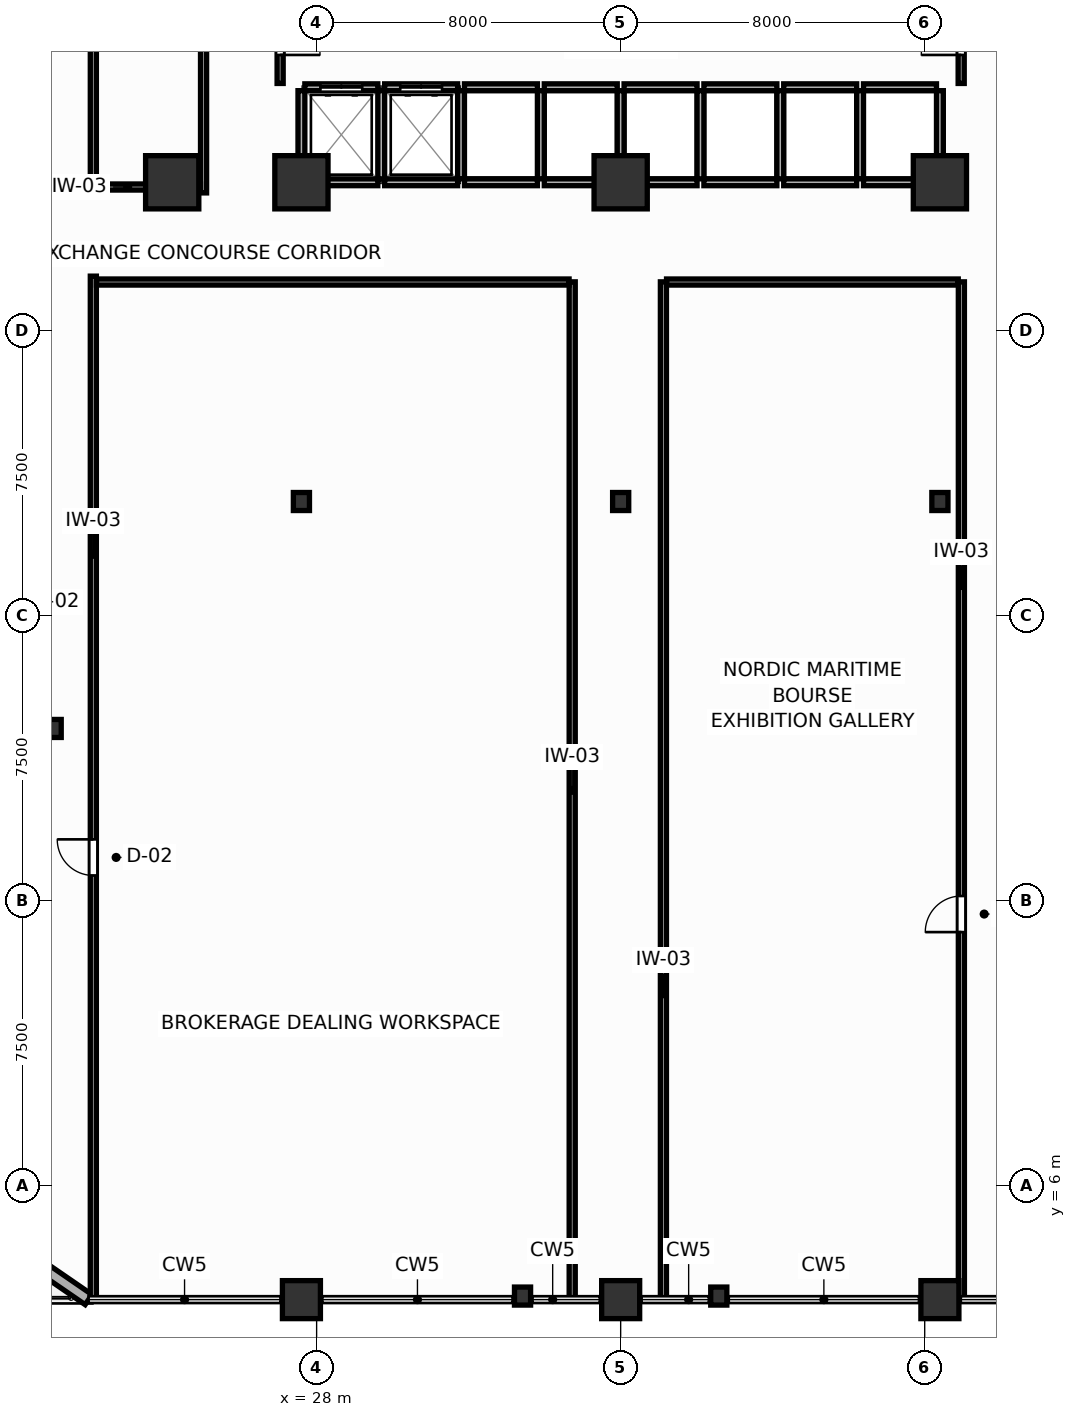
"""IFC4 building model, lengths in metres.
Left out: names, types, materials, properties, quantities, classifications, styles, units other than length and angle.
Written with IfcOpenShell. Run it as: python <this file> out.ifc"""

import sys

from ifc_helpers import new_model, si_unit, direction, frame, frame_2d, origin, origin_2d, place, context, subcontext, project, spatial, rectangle, i_section, extrude, source, transform, mapped, element, fill, save


model = new_model("IFC4")
c1 = context("Model", 3, precision=1e-05, world=origin(), true_north=direction((0.0, 1.0)))
c2 = subcontext(c1, "Body", "Model", "MODEL_VIEW")
j1 = project(units=[si_unit("LENGTHUNIT", "METRE"), si_unit("PLANEANGLEUNIT", "RADIAN")], contexts=[c1])
p1 = place(None, origin())
s1 = spatial("IfcSite", under=j1, at=p1, CompositionType="ELEMENT")
p2 = place(p1, origin())
s2 = spatial("IfcBuilding", under=s1, at=p2, CompositionType="ELEMENT")
p3 = place(p2, frame((0.0, 0.0, 19.2)))
s3 = spatial("IfcBuildingStorey", under=s2, at=p3, CompositionType="ELEMENT", Elevation=19.2)
m1 = source(origin(), c2, "Body", "SweptSolid", [
    extrude(rectangle(XDim=1.4, YDim=1.4, at=origin_2d()), origin(), (0.0, 0.0, 1.0), 4.8),
])
for number, where, z_axis, x_axis in (
    (1, (27.6, 32.4, 0.0), (0.0, 0.0, 1.0), (1.0, 0.0, 0.0)),
    (2, (44.4, 32.4, 0.0), (0.0, 0.0, 1.0), (1.0, 0.0, 0.0)),
    (3, (36.0, 32.4, 0.0), (0.0, 0.0, 1.0), (1.0, 0.0, 0.0)),
    (4, (24.2, 32.4, 0.0), (0.0, 0.0, 1.0), (1.0, 0.0, 0.0)),
):
    element("IfcColumn", number, at=place(p3, frame(where, z_axis=z_axis, x_axis=x_axis)), inside=s3, PredefinedType="COLUMN", context=c2, shape_type="MappedRepresentation", body=[
        mapped(m1, transform((0.0, 0.0, 0.0), scale=1.0)),
    ])
m2 = source(origin(), c2, "Body", "SweptSolid", [
    extrude(i_section(OverallWidth=0.424, OverallDepth=0.474, WebThickness=0.045, FlangeThickness=0.072, FilletRadius=0.015, at=origin_2d()), origin(), (0.0, 0.0, 1.0), 4.8),
])
for number, where, z_axis, x_axis in (
    (5, (27.6, 24.0, 0.0), (0.0, 0.0, 1.0), (1.0, 0.0, 0.0)),
    (6, (44.4, 24.0, 0.0), (0.0, 0.0, 1.0), (1.0, 0.0, 0.0)),
    (7, (36.0, 24.0, 0.0), (0.0, 0.0, 1.0), (1.0, 0.0, 0.0)),
):
    element("IfcColumn", number, at=place(p3, frame(where, z_axis=z_axis, x_axis=x_axis)), inside=s3, PredefinedType="COLUMN", context=c2, shape_type="MappedRepresentation", body=[
        mapped(m2, transform((0.0, 0.0, 0.0), scale=1.0)),
    ])
m3 = source(origin(), c2, "Body", "SweptSolid", [
    extrude(rectangle(XDim=1.0, YDim=1.0, at=origin_2d()), origin(), (0.0, 0.0, 1.0), 4.8),
])
for number, where, z_axis, x_axis in (
    (8, (27.6, 3.0, 0.0), (0.0, 0.0, 1.0), (1.0, 0.0, 0.0)),
    (9, (36.0, 3.0, 0.0), (0.0, 0.0, 1.0), (1.0, 0.0, 0.0)),
    (10, (44.4, 3.0, 0.0), (0.0, 0.0, 1.0), (1.0, 0.0, 0.0)),
):
    element("IfcColumn", number, at=place(p3, frame(where, z_axis=z_axis, x_axis=x_axis)), inside=s3, PredefinedType="COLUMN", context=c2, shape_type="MappedRepresentation", body=[
        mapped(m3, transform((0.0, 0.0, 0.0), scale=1.0)),
    ])
for number, where, z_axis, x_axis in (
    (11, (21.068, 18.029, 0.0), (0.0, 0.0, 1.0), (1.0, 0.0, 0.0)),
    (12, (33.418, 3.094, 0.0), (0.0, 0.0, 1.0), (1.0, 0.0, 0.0)),
    (13, (38.582, 3.094, 0.0), (0.0, 0.0, 1.0), (1.0, 0.0, 0.0)),
):
    element("IfcColumn", number, at=place(p3, frame(where, z_axis=z_axis, x_axis=x_axis)), inside=s3, PredefinedType="COLUMN", context=c2, shape_type="MappedRepresentation", body=[
        mapped(m2, transform((0.0, 0.0, 0.0), scale=1.0)),
    ])
p4 = place(p3, frame((6.0, 14.0, 0.0), z_axis=(0.0, 0.0, 1.0), x_axis=(0.824041924199, -0.566528822887, 0.0)))
e14 = element("IfcWall", 14, at=p4, inside=s3, PredefinedType="SOLIDWALL", context=c2, shape_type="SweptSolid", body=[
    extrude(rectangle(XDim=19.417, YDim=0.32, at=frame_2d((9.708, 0.0))), origin(), (0.0, 0.0, 1.0), 4.58),
])
p5 = place(p4, frame((9.183, 0.0, 0.0)))
e15 = element("IfcOpeningElement", 15, at=p5, cuts=e14, PredefinedType="OPENING", context=c2, shape_type="SweptSolid", body=[
    extrude(rectangle(XDim=1.05, YDim=2.1, at=frame_2d((0.525, 1.05))), frame((0.0, 0.17, 0.0), z_axis=(0.0, -1.0, 0.0), x_axis=(1.0, 0.0, 0.0)), (0.0, 0.0, 1.0), 0.34),
])
p6 = place(p3, frame((27.69, 34.9, 0.0), z_axis=(0.0, 0.0, 1.0), x_axis=(1.0, 0.0, 0.0)))
e16 = element("IfcWall", 16, at=p6, inside=s3, PredefinedType="PARTITIONING", context=c2, shape_type="SweptSolid", body=[
    extrude(rectangle(XDim=1.92, YDim=0.18, at=frame_2d((0.96, 0.0))), origin(), (0.0, 0.0, 1.0), 4.58),
])
p7 = place(p6, frame((0.41, 0.0, 0.0)))
e17 = element("IfcOpeningElement", 17, at=p7, cuts=e16, PredefinedType="OPENING", context=c2, shape_type="SweptSolid", body=[
    extrude(rectangle(XDim=1.1, YDim=2.1, at=frame_2d((0.55, 1.05))), frame((0.0, 0.1, 0.0), z_axis=(0.0, -1.0, 0.0), x_axis=(1.0, 0.0, 0.0)), (0.0, 0.0, 1.0), 0.2),
])
p8 = place(p3, frame((27.69, 32.4, 0.0), z_axis=(0.0, 0.0, 1.0), x_axis=(1.0, 0.0, 0.0)))
e18 = element("IfcWall", 18, at=p8, inside=s3, PredefinedType="PARTITIONING", context=c2, shape_type="SweptSolid", body=[
    extrude(rectangle(XDim=1.92, YDim=0.18, at=frame_2d((0.96, 0.0))), origin(), (0.0, 0.0, 1.0), 3.88),
])
p9 = place(p3, frame((27.6, 32.49, 0.0), z_axis=(0.0, 0.0, 1.0), x_axis=(0.0, 1.0, 0.0)))
e19 = element("IfcWall", 19, at=p9, inside=s3, PredefinedType="PARTITIONING", context=c2, shape_type="SweptSolid", body=[
    extrude(rectangle(XDim=2.32, YDim=0.18, at=frame_2d((1.16, 0.0))), origin(), (0.0, 0.0, 1.0), 4.58),
])
p10 = place(p3, frame((29.79, 34.9, 0.0), z_axis=(0.0, 0.0, 1.0), x_axis=(1.0, 0.0, 0.0)))
e20 = element("IfcWall", 20, at=p10, inside=s3, PredefinedType="PARTITIONING", context=c2, shape_type="SweptSolid", body=[
    extrude(rectangle(XDim=1.92, YDim=0.18, at=frame_2d((0.96, 0.0))), origin(), (0.0, 0.0, 1.0), 4.58),
])
p11 = place(p10, frame((0.41, 0.0, 0.0)))
e21 = element("IfcOpeningElement", 21, at=p11, cuts=e20, PredefinedType="OPENING", context=c2, shape_type="SweptSolid", body=[
    extrude(rectangle(XDim=1.1, YDim=2.1, at=frame_2d((0.55, 1.05))), frame((0.0, 0.1, 0.0), z_axis=(0.0, -1.0, 0.0), x_axis=(1.0, 0.0, 0.0)), (0.0, 0.0, 1.0), 0.2),
])
p12 = place(p3, frame((29.79, 32.4, 0.0), z_axis=(0.0, 0.0, 1.0), x_axis=(1.0, 0.0, 0.0)))
e22 = element("IfcWall", 22, at=p12, inside=s3, PredefinedType="PARTITIONING", context=c2, shape_type="SweptSolid", body=[
    extrude(rectangle(XDim=1.92, YDim=0.18, at=frame_2d((0.96, 0.0))), origin(), (0.0, 0.0, 1.0), 3.88),
])
p13 = place(p3, frame((29.7, 32.49, 0.0), z_axis=(0.0, 0.0, 1.0), x_axis=(0.0, 1.0, 0.0)))
e23 = element("IfcWall", 23, at=p13, inside=s3, PredefinedType="PARTITIONING", context=c2, shape_type="SweptSolid", body=[
    extrude(rectangle(XDim=2.32, YDim=0.18, at=frame_2d((1.16, 0.0))), origin(), (0.0, 0.0, 1.0), 4.58),
])
p14 = place(p3, frame((31.89, 34.9, 0.0), z_axis=(0.0, 0.0, 1.0), x_axis=(1.0, 0.0, 0.0)))
e24 = element("IfcWall", 24, at=p14, inside=s3, PredefinedType="PARTITIONING", context=c2, shape_type="SweptSolid", body=[
    extrude(rectangle(XDim=1.92, YDim=0.18, at=frame_2d((0.96, 0.0))), origin(), (0.0, 0.0, 1.0), 4.58),
])
p15 = place(p3, frame((31.89, 32.4, 0.0), z_axis=(0.0, 0.0, 1.0), x_axis=(1.0, 0.0, 0.0)))
e25 = element("IfcWall", 25, at=p15, inside=s3, PredefinedType="PARTITIONING", context=c2, shape_type="SweptSolid", body=[
    extrude(rectangle(XDim=1.92, YDim=0.18, at=frame_2d((0.96, 0.0))), origin(), (0.0, 0.0, 1.0), 3.88),
])
p16 = place(p3, frame((31.8, 32.49, 0.0), z_axis=(0.0, 0.0, 1.0), x_axis=(0.0, 1.0, 0.0)))
e26 = element("IfcWall", 26, at=p16, inside=s3, PredefinedType="PARTITIONING", context=c2, shape_type="SweptSolid", body=[
    extrude(rectangle(XDim=2.32, YDim=0.18, at=frame_2d((1.16, 0.0))), origin(), (0.0, 0.0, 1.0), 4.58),
])
p17 = place(p3, frame((33.99, 34.9, 0.0), z_axis=(0.0, 0.0, 1.0), x_axis=(1.0, 0.0, 0.0)))
e27 = element("IfcWall", 27, at=p17, inside=s3, PredefinedType="PARTITIONING", context=c2, shape_type="SweptSolid", body=[
    extrude(rectangle(XDim=1.92, YDim=0.18, at=frame_2d((0.96, 0.0))), origin(), (0.0, 0.0, 1.0), 4.58),
])
p18 = place(p3, frame((33.99, 32.4, 0.0), z_axis=(0.0, 0.0, 1.0), x_axis=(1.0, 0.0, 0.0)))
e28 = element("IfcWall", 28, at=p18, inside=s3, PredefinedType="PARTITIONING", context=c2, shape_type="SweptSolid", body=[
    extrude(rectangle(XDim=1.92, YDim=0.18, at=frame_2d((0.96, 0.0))), origin(), (0.0, 0.0, 1.0), 3.88),
])
p19 = place(p3, frame((33.9, 32.49, 0.0), z_axis=(0.0, 0.0, 1.0), x_axis=(0.0, 1.0, 0.0)))
e29 = element("IfcWall", 29, at=p19, inside=s3, PredefinedType="PARTITIONING", context=c2, shape_type="SweptSolid", body=[
    extrude(rectangle(XDim=2.32, YDim=0.18, at=frame_2d((1.16, 0.0))), origin(), (0.0, 0.0, 1.0), 4.58),
])
p20 = place(p3, frame((36.09, 34.9, 0.0), z_axis=(0.0, 0.0, 1.0), x_axis=(1.0, 0.0, 0.0)))
e30 = element("IfcWall", 30, at=p20, inside=s3, PredefinedType="PARTITIONING", context=c2, shape_type="SweptSolid", body=[
    extrude(rectangle(XDim=1.92, YDim=0.18, at=frame_2d((0.96, 0.0))), origin(), (0.0, 0.0, 1.0), 4.58),
])
p21 = place(p3, frame((36.09, 32.4, 0.0), z_axis=(0.0, 0.0, 1.0), x_axis=(1.0, 0.0, 0.0)))
e31 = element("IfcWall", 31, at=p21, inside=s3, PredefinedType="PARTITIONING", context=c2, shape_type="SweptSolid", body=[
    extrude(rectangle(XDim=1.92, YDim=0.18, at=frame_2d((0.96, 0.0))), origin(), (0.0, 0.0, 1.0), 3.88),
])
p22 = place(p3, frame((36.0, 32.49, 0.0), z_axis=(0.0, 0.0, 1.0), x_axis=(0.0, 1.0, 0.0)))
e32 = element("IfcWall", 32, at=p22, inside=s3, PredefinedType="PARTITIONING", context=c2, shape_type="SweptSolid", body=[
    extrude(rectangle(XDim=2.32, YDim=0.18, at=frame_2d((1.16, 0.0))), origin(), (0.0, 0.0, 1.0), 4.58),
])
p23 = place(p3, frame((38.19, 34.9, 0.0), z_axis=(0.0, 0.0, 1.0), x_axis=(1.0, 0.0, 0.0)))
e33 = element("IfcWall", 33, at=p23, inside=s3, PredefinedType="PARTITIONING", context=c2, shape_type="SweptSolid", body=[
    extrude(rectangle(XDim=1.92, YDim=0.18, at=frame_2d((0.96, 0.0))), origin(), (0.0, 0.0, 1.0), 4.58),
])
p24 = place(p3, frame((38.19, 32.4, 0.0), z_axis=(0.0, 0.0, 1.0), x_axis=(1.0, 0.0, 0.0)))
e34 = element("IfcWall", 34, at=p24, inside=s3, PredefinedType="PARTITIONING", context=c2, shape_type="SweptSolid", body=[
    extrude(rectangle(XDim=1.92, YDim=0.18, at=frame_2d((0.96, 0.0))), origin(), (0.0, 0.0, 1.0), 3.88),
])
p25 = place(p3, frame((38.1, 32.49, 0.0), z_axis=(0.0, 0.0, 1.0), x_axis=(0.0, 1.0, 0.0)))
e35 = element("IfcWall", 35, at=p25, inside=s3, PredefinedType="PARTITIONING", context=c2, shape_type="SweptSolid", body=[
    extrude(rectangle(XDim=2.32, YDim=0.18, at=frame_2d((1.16, 0.0))), origin(), (0.0, 0.0, 1.0), 4.58),
])
p26 = place(p3, frame((40.29, 34.9, 0.0), z_axis=(0.0, 0.0, 1.0), x_axis=(1.0, 0.0, 0.0)))
e36 = element("IfcWall", 36, at=p26, inside=s3, PredefinedType="PARTITIONING", context=c2, shape_type="SweptSolid", body=[
    extrude(rectangle(XDim=1.92, YDim=0.18, at=frame_2d((0.96, 0.0))), origin(), (0.0, 0.0, 1.0), 4.58),
])
p27 = place(p3, frame((40.29, 32.4, 0.0), z_axis=(0.0, 0.0, 1.0), x_axis=(1.0, 0.0, 0.0)))
e37 = element("IfcWall", 37, at=p27, inside=s3, PredefinedType="PARTITIONING", context=c2, shape_type="SweptSolid", body=[
    extrude(rectangle(XDim=1.92, YDim=0.18, at=frame_2d((0.96, 0.0))), origin(), (0.0, 0.0, 1.0), 3.88),
])
p28 = place(p3, frame((40.2, 32.49, 0.0), z_axis=(0.0, 0.0, 1.0), x_axis=(0.0, 1.0, 0.0)))
e38 = element("IfcWall", 38, at=p28, inside=s3, PredefinedType="PARTITIONING", context=c2, shape_type="SweptSolid", body=[
    extrude(rectangle(XDim=2.32, YDim=0.18, at=frame_2d((1.16, 0.0))), origin(), (0.0, 0.0, 1.0), 4.58),
])
p29 = place(p3, frame((42.39, 34.9, 0.0), z_axis=(0.0, 0.0, 1.0), x_axis=(1.0, 0.0, 0.0)))
e39 = element("IfcWall", 39, at=p29, inside=s3, PredefinedType="PARTITIONING", context=c2, shape_type="SweptSolid", body=[
    extrude(rectangle(XDim=1.92, YDim=0.18, at=frame_2d((0.96, 0.0))), origin(), (0.0, 0.0, 1.0), 4.58),
])
p30 = place(p3, frame((42.39, 32.4, 0.0), z_axis=(0.0, 0.0, 1.0), x_axis=(1.0, 0.0, 0.0)))
e40 = element("IfcWall", 40, at=p30, inside=s3, PredefinedType="PARTITIONING", context=c2, shape_type="SweptSolid", body=[
    extrude(rectangle(XDim=1.92, YDim=0.18, at=frame_2d((0.96, 0.0))), origin(), (0.0, 0.0, 1.0), 3.88),
])
for number, where, z_axis, x_axis in (
    (41, (42.3, 32.49, 0.0), (0.0, 0.0, 1.0), (0.0, 1.0, 0.0)),
    (42, (44.4, 32.49, 0.0), (0.0, 0.0, 1.0), (0.0, 1.0, 0.0)),
):
    element("IfcWall", number, at=place(p3, frame(where, z_axis=z_axis, x_axis=x_axis)), inside=s3, PredefinedType="PARTITIONING", context=c2, shape_type="SweptSolid", body=[
        extrude(rectangle(XDim=2.32, YDim=0.18, at=frame_2d((1.16, 0.0))), origin(), (0.0, 0.0, 1.0), 4.58),
    ])
p31 = place(p3, frame((27.04, 35.0, 0.0), z_axis=(0.0, 0.0, 1.0), x_axis=(0.0, 1.0, 0.0)))
e43 = element("IfcWall", 43, at=p31, inside=s3, PredefinedType="PARTITIONING", context=c2, shape_type="SweptSolid", body=[
    extrude(rectangle(XDim=2.65, YDim=0.16, at=frame_2d((1.325, 0.0))), origin(), (0.0, 0.0, 1.0), 4.58),
])
p32 = place(p31, frame((0.75, 0.0, 0.0)))
e44 = element("IfcOpeningElement", 44, at=p32, cuts=e43, PredefinedType="OPENING", context=c2, shape_type="SweptSolid", body=[
    extrude(rectangle(XDim=1.05, YDim=2.1, at=frame_2d((0.525, 1.05))), frame((0.0, 0.09, 0.0), z_axis=(0.0, -1.0, 0.0), x_axis=(1.0, 0.0, 0.0)), (0.0, 0.0, 1.0), 0.18),
])
p33 = place(p3, frame((44.96, 35.0, 0.0), z_axis=(0.0, 0.0, 1.0), x_axis=(0.0, 1.0, 0.0)))
e45 = element("IfcWall", 45, at=p33, inside=s3, PredefinedType="PARTITIONING", context=c2, shape_type="SweptSolid", body=[
    extrude(rectangle(XDim=2.65, YDim=0.16, at=frame_2d((1.325, 0.0))), origin(), (0.0, 0.0, 1.0), 4.58),
])
p34 = place(p33, frame((0.75, 0.0, 0.0)))
e46 = element("IfcOpeningElement", 46, at=p34, cuts=e45, PredefinedType="OPENING", context=c2, shape_type="SweptSolid", body=[
    extrude(rectangle(XDim=1.05, YDim=2.1, at=frame_2d((0.525, 1.05))), frame((0.0, 0.09, 0.0), z_axis=(0.0, -1.0, 0.0), x_axis=(1.0, 0.0, 0.0)), (0.0, 0.0, 1.0), 0.18),
])
p35 = place(p3, frame((22.125, 3.02, 0.0), z_axis=(0.0, 0.0, 1.0), x_axis=(9.072517e-06, 0.999999999959, 0.0)))
e47 = element("IfcWall", 47, at=p35, inside=s3, PredefinedType="PARTITIONING", context=c2, shape_type="SweptSolid", body=[
    extrude(rectangle(XDim=26.91, YDim=0.16, at=frame_2d((13.455, 0.0))), origin(), (0.0, 0.0, 1.0), 4.58),
])
p36 = place(p35, frame((11.14, 0.0, 0.0)))
e48 = element("IfcOpeningElement", 48, at=p36, cuts=e47, PredefinedType="OPENING", context=c2, shape_type="SweptSolid", body=[
    extrude(rectangle(XDim=0.95, YDim=2.05, at=frame_2d((0.475, 1.025))), frame((0.0, 0.09, 0.0), z_axis=(0.0, -1.0, 0.0), x_axis=(1.0, 0.0, 0.0)), (0.0, 0.0, 1.0), 0.18),
])
p37 = place(p3, frame((25.025, 32.12, 0.0), z_axis=(0.0, 0.0, 1.0), x_axis=(0.0, 1.0, 0.0)))
e49 = element("IfcWall", 49, at=p37, inside=s3, PredefinedType="PARTITIONING", context=c2, shape_type="SweptSolid", body=[
    extrude(rectangle(XDim=26.86, YDim=0.16, at=frame_2d((13.43, 0.0))), origin(), (0.0, 0.0, 1.0), 4.58),
])
p38 = place(p37, frame((11.648, 0.0, 0.0)))
e50 = element("IfcOpeningElement", 50, at=p38, cuts=e49, PredefinedType="OPENING", context=c2, shape_type="SweptSolid", body=[
    extrude(rectangle(XDim=0.95, YDim=2.05, at=frame_2d((0.475, 1.025))), frame((0.0, 0.09, 0.0), z_axis=(0.0, -1.0, 0.0), x_axis=(1.0, 0.0, 0.0)), (0.0, 0.0, 1.0), 0.18),
])
p39 = place(p3, frame((44.965, 3.02, 0.0), z_axis=(0.0, 0.0, 1.0), x_axis=(0.0, 1.0, 0.0)))
e51 = element("IfcWall", 51, at=p39, inside=s3, PredefinedType="PARTITIONING", context=c2, shape_type="SweptSolid", body=[
    extrude(rectangle(XDim=26.76, YDim=0.16, at=frame_2d((13.38, 0.0))), origin(), (0.0, 0.0, 1.0), 4.58),
])
p40 = place(p39, frame((9.65, 0.0, 0.0)))
e52 = element("IfcOpeningElement", 52, at=p40, cuts=e51, PredefinedType="OPENING", context=c2, shape_type="SweptSolid", body=[
    extrude(rectangle(XDim=0.95, YDim=2.05, at=frame_2d((0.475, 1.025))), frame((0.0, 0.09, 0.0), z_axis=(0.0, -1.0, 0.0), x_axis=(1.0, 0.0, 0.0)), (0.0, 0.0, 1.0), 0.18),
])
for number, where, z_axis, x_axis in (
    (53, (37.125, 3.02, 0.0), (0.0, 0.0, 1.0), (0.0, 1.0, 0.0)),
    (54, (34.725, 3.02, 0.0), (0.0, 0.0, 1.0), (0.0, 1.0, 0.0)),
):
    element("IfcWall", number, at=place(p3, frame(where, z_axis=z_axis, x_axis=x_axis)), inside=s3, PredefinedType="PARTITIONING", context=c2, shape_type="SweptSolid", body=[
        extrude(rectangle(XDim=26.76, YDim=0.16, at=frame_2d((13.38, 0.0))), origin(), (0.0, 0.0, 1.0), 4.58),
    ])
p41 = place(p3, frame((22.125, 32.27, 0.0), z_axis=(0.0, 0.0, 1.0), x_axis=(0.0, 1.0, 0.0)))
e55 = element("IfcWall", 55, at=p41, inside=s3, PredefinedType="PARTITIONING", context=c2, shape_type="SweptSolid", body=[
    extrude(rectangle(XDim=26.71, YDim=0.16, at=frame_2d((13.355, 0.0))), origin(), (0.0, 0.0, 1.0), 4.58),
])
p42 = place(p3, frame((22.207, 29.775, 0.0), z_axis=(0.0, 0.0, 1.0), x_axis=(1.0, 0.0, 0.0)))
e56 = element("IfcWall", 56, at=p42, inside=s3, PredefinedType="PARTITIONING", context=c2, shape_type="SweptSolid", body=[
    extrude(rectangle(XDim=12.436, YDim=0.16, at=frame_2d((6.218, 0.0))), origin(), (0.0, 0.0, 1.0), 4.58),
])
p43 = place(p3, frame((37.207, 29.775, 0.0), z_axis=(0.0, 0.0, 1.0), x_axis=(1.0, 0.0, 0.0)))
e57 = element("IfcWall", 57, at=p43, inside=s3, PredefinedType="PARTITIONING", context=c2, shape_type="SweptSolid", body=[
    extrude(rectangle(XDim=7.676, YDim=0.16, at=frame_2d((3.838, 0.0))), origin(), (0.0, 0.0, 1.0), 4.58),
])
p44 = place(p3, frame((22.207, 32.275, 0.0), z_axis=(0.0, 0.0, 1.0), x_axis=(1.0, 0.0, 0.0)))
e58 = element("IfcWall", 58, at=p44, inside=s3, PredefinedType="PARTITIONING", context=c2, shape_type="SweptSolid", body=[
    extrude(rectangle(XDim=2.736, YDim=0.16, at=frame_2d((1.368, 0.0))), origin(), (0.0, 0.0, 1.0), 3.88),
])
p45 = place(p7, origin())
e59 = element("IfcDoor", 59, at=p45, inside=s3, OperationType="DOUBLE_DOOR_SLIDING", PredefinedType="DOOR", context=c2, shape_type="SweptSolid", body=[
    extrude(rectangle(XDim=1.1, YDim=2.1, at=frame_2d((0.55, 1.05))), frame((0.0, 0.025, 0.0), z_axis=(0.0, -1.0, 0.0), x_axis=(1.0, 0.0, 0.0)), (0.0, 0.0, 1.0), 0.05),
])
fill(e17, e59)
p46 = place(p11, origin())
e60 = element("IfcDoor", 60, at=p46, inside=s3, OperationType="DOUBLE_DOOR_SLIDING", PredefinedType="DOOR", context=c2, shape_type="SweptSolid", body=[
    extrude(rectangle(XDim=1.1, YDim=2.1, at=frame_2d((0.55, 1.05))), frame((0.0, 0.025, 0.0), z_axis=(0.0, -1.0, 0.0), x_axis=(1.0, 0.0, 0.0)), (0.0, 0.0, 1.0), 0.05),
])
fill(e21, e60)
p47 = place(p32, frame((1.05, 0.0, 0.0), z_axis=(0.0, 0.0, 1.0), x_axis=(-1.0, 0.0, 0.0)))
e61 = element("IfcDoor", 61, at=p47, inside=s3, OperationType="SINGLE_SWING_RIGHT", PredefinedType="DOOR", context=c2, shape_type="SweptSolid", body=[
    extrude(rectangle(XDim=1.05, YDim=2.1, at=frame_2d((0.525, 1.05))), frame((0.0, 0.025, 0.0), z_axis=(0.0, -1.0, 0.0), x_axis=(1.0, 0.0, 0.0)), (0.0, 0.0, 1.0), 0.05),
])
fill(e44, e61)
p48 = place(p34, origin())
e62 = element("IfcDoor", 62, at=p48, inside=s3, OperationType="SINGLE_SWING_LEFT", PredefinedType="DOOR", context=c2, shape_type="SweptSolid", body=[
    extrude(rectangle(XDim=1.05, YDim=2.1, at=frame_2d((0.525, 1.05))), frame((0.0, 0.025, 0.0), z_axis=(0.0, -1.0, 0.0), x_axis=(1.0, 0.0, 0.0)), (0.0, 0.0, 1.0), 0.05),
])
fill(e46, e62)
p49 = place(p36, origin())
e63 = element("IfcDoor", 63, at=p49, inside=s3, OperationType="SINGLE_SWING_RIGHT", PredefinedType="DOOR", context=c2, shape_type="SweptSolid", body=[
    extrude(rectangle(XDim=0.95, YDim=2.05, at=frame_2d((0.475, 1.025))), frame((0.0, 0.025, 0.0), z_axis=(0.0, -1.0, 0.0), x_axis=(1.0, 0.0, 0.0)), (0.0, 0.0, 1.0), 0.05),
])
fill(e48, e63)
p50 = place(p40, origin())
e64 = element("IfcDoor", 64, at=p50, inside=s3, OperationType="SINGLE_SWING_LEFT", PredefinedType="DOOR", context=c2, shape_type="SweptSolid", body=[
    extrude(rectangle(XDim=0.95, YDim=2.05, at=frame_2d((0.475, 1.025))), frame((0.0, 0.025, 0.0), z_axis=(0.0, -1.0, 0.0), x_axis=(1.0, 0.0, 0.0)), (0.0, 0.0, 1.0), 0.05),
])
fill(e52, e64)
save(model, sys.argv[1])
